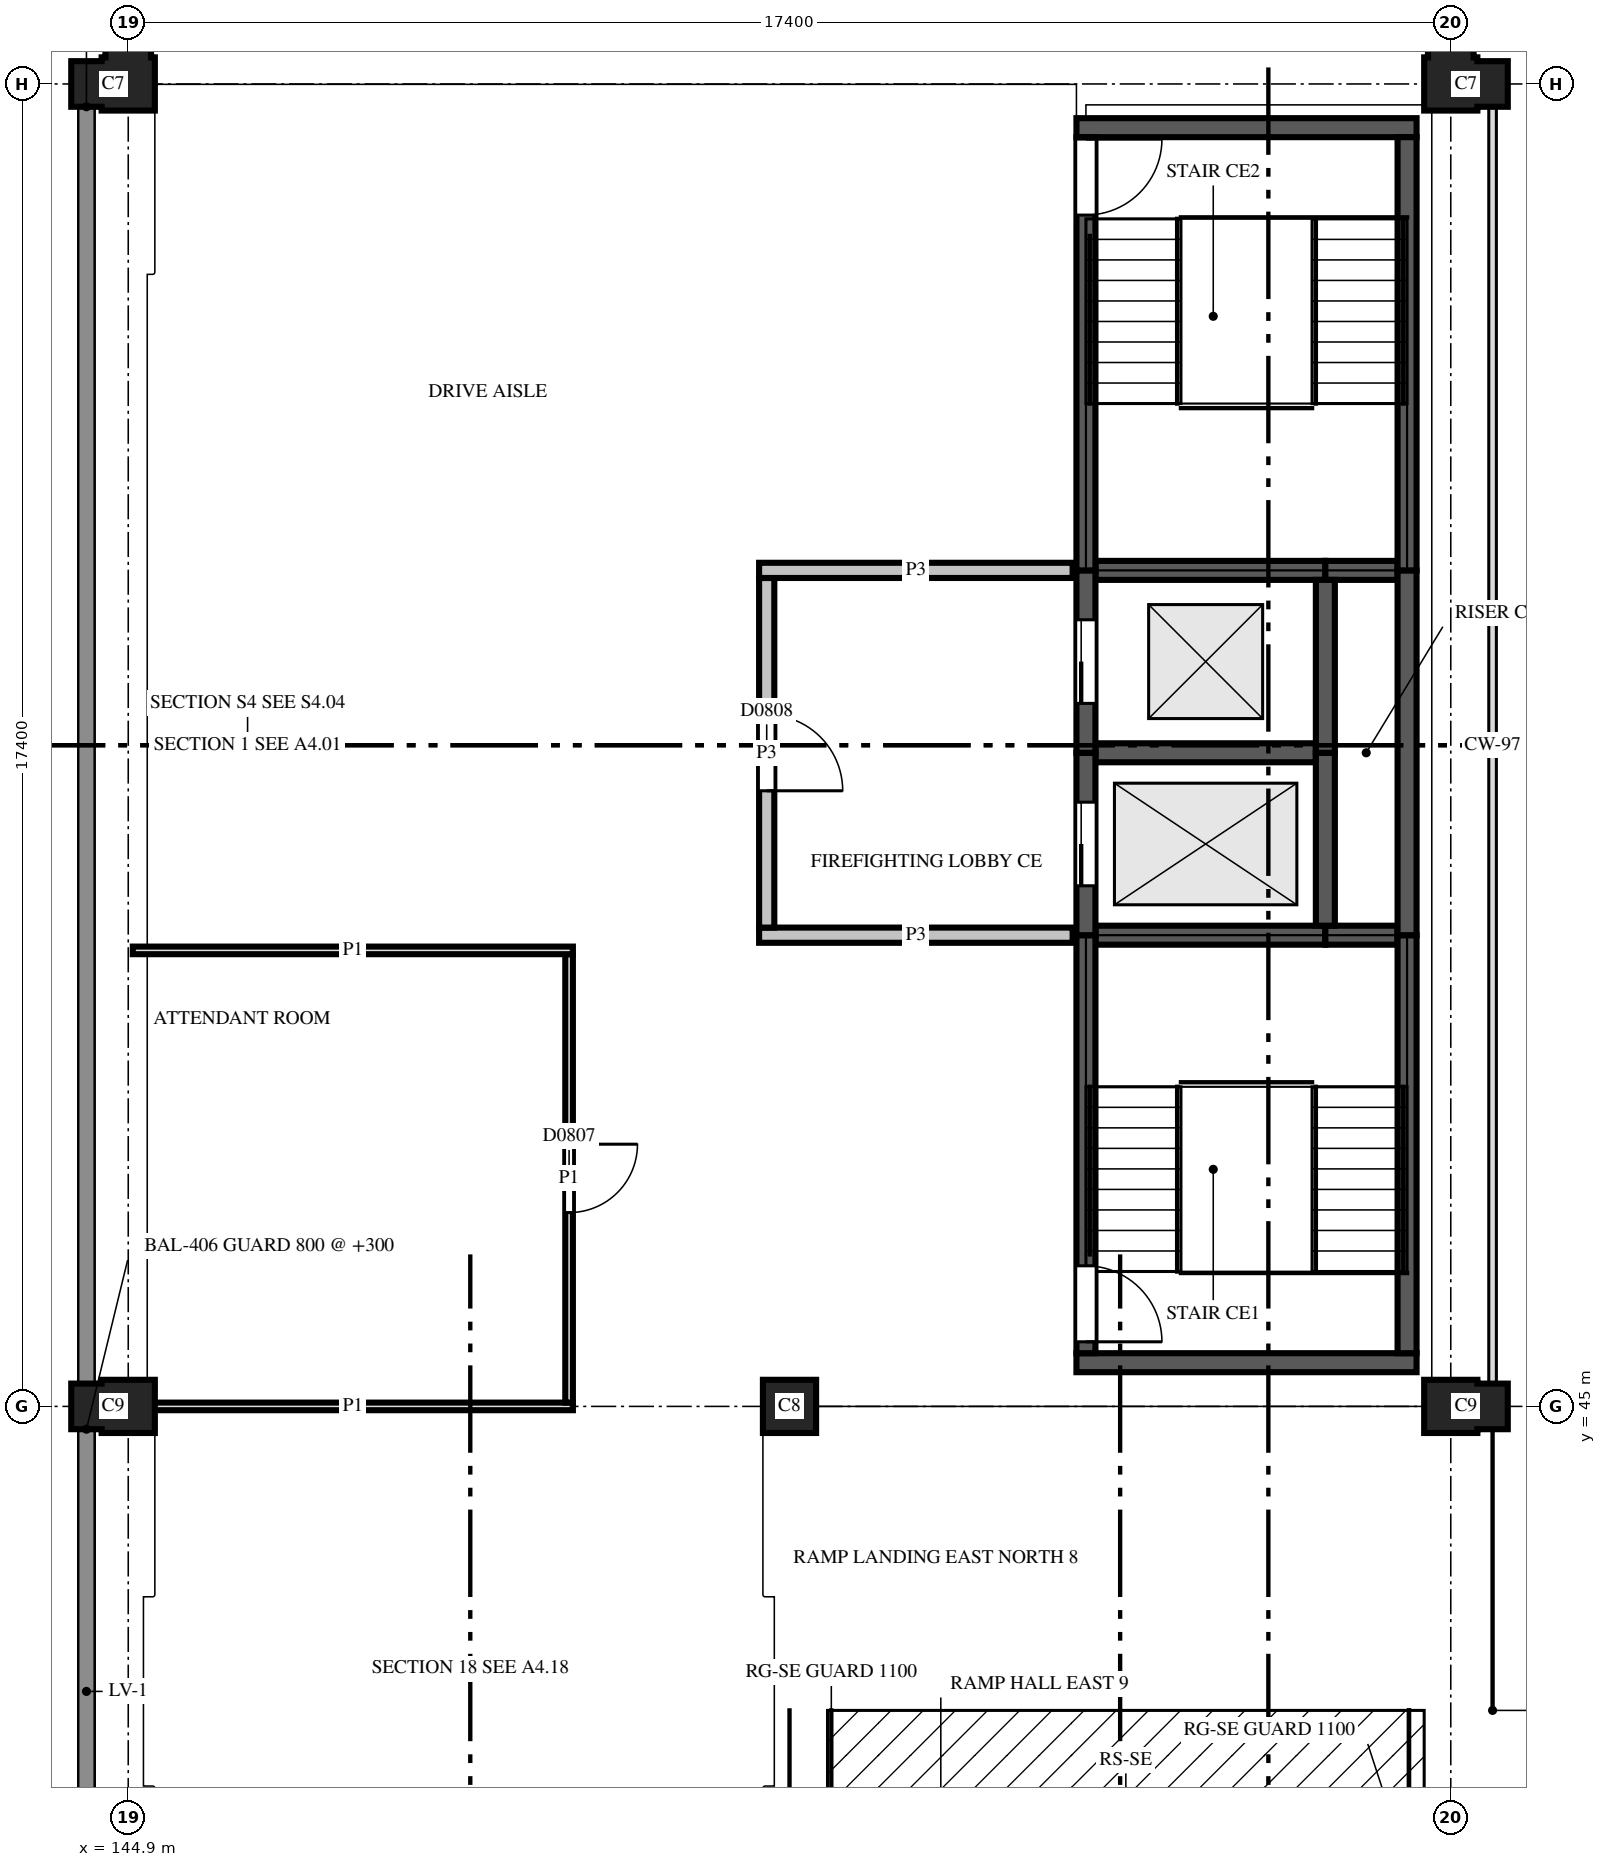
"""IFC4 building model, lengths in metres.
Left out: names, types, materials, properties, quantities, classifications, styles, units other than length and angle.
Written with IfcOpenShell. Run it as: python <this file> out.ifc"""

import sys

from ifc_helpers import new_model, si_unit, direction, frame, frame_2d, origin, place, context, subcontext, project, spatial, polyline, rectangle, outline, extrude, element, fill, save


model = new_model("IFC4")
c1 = context("Model", 3, precision=1e-05, world=origin(), true_north=direction((0.0, 1.0)))
c2 = subcontext(c1, "Body", "Model", "MODEL_VIEW")
j1 = project(units=[si_unit("LENGTHUNIT", "METRE"), si_unit("PLANEANGLEUNIT", "RADIAN")], contexts=[c1])
p1 = place(None, origin())
s1 = spatial("IfcSite", under=j1, at=p1, CompositionType="ELEMENT")
p2 = place(p1, origin())
s2 = spatial("IfcBuilding", under=s1, at=p2, CompositionType="ELEMENT")
p3 = place(p2, frame((0.0, 0.0, 30.4)))
s3 = spatial("IfcBuildingStorey", under=s2, at=p3, CompositionType="ELEMENT", Elevation=30.4)
p4 = place(p3, frame((144.9, 45.0, 0.0), z_axis=(0.0, 0.0, 1.0), x_axis=(-1.0, 0.0, 0.0)))
e1 = element("IfcColumn", 1, at=p4, inside=s3, PredefinedType="COLUMN", context=c2, shape_type="SweptSolid", body=[
    extrude(outline(polyline([(-0.35, -0.35), (0.35, -0.35), (0.35, -0.3), (0.75, -0.3), (0.75, 0.3), (0.35, 0.3), (0.35, 0.35), (-0.35, 0.35), (-0.35, -0.35)])), origin(), (0.0, 0.0, 1.0), 3.7),
])
p5 = place(p3, frame((153.6, 45.0, 0.0), z_axis=(0.0, 0.0, 1.0), x_axis=(1.0, 0.0, 0.0)))
e2 = element("IfcColumn", 2, at=p5, inside=s3, PredefinedType="COLUMN", context=c2, shape_type="SweptSolid", body=[
    extrude(outline(polyline([(-0.35, -0.35), (0.35, -0.35), (0.35, 0.35), (-0.35, 0.35), (-0.35, -0.35)])), origin(), (0.0, 0.0, 1.0), 3.7),
])
p6 = place(p3, frame((162.3, 45.0, 0.0), z_axis=(0.0, 0.0, 1.0), x_axis=(1.0, 0.0, 0.0)))
e3 = element("IfcColumn", 3, at=p6, inside=s3, PredefinedType="COLUMN", context=c2, shape_type="SweptSolid", body=[
    extrude(outline(polyline([(-0.35, -0.35), (0.35, -0.35), (0.35, -0.3), (0.75, -0.3), (0.75, 0.3), (0.35, 0.3), (0.35, 0.35), (-0.35, 0.35), (-0.35, -0.35)])), origin(), (0.0, 0.0, 1.0), 3.7),
])
for number, where, z_axis, x_axis in (
    (4, (144.9, 62.4, 0.0), (0.0, 0.0, 1.0), (0.0, 1.0, 0.0)),
    (5, (162.3, 62.4, 0.0), (0.0, 0.0, 1.0), (1.0, 0.0, 0.0)),
):
    element("IfcColumn", number, at=place(p3, frame(where, z_axis=z_axis, x_axis=x_axis)), inside=s3, PredefinedType="COLUMN", context=c2, shape_type="SweptSolid", body=[
        extrude(outline(polyline([(-0.35, -0.35), (0.35, -0.35), (0.35, -0.3), (0.75, -0.3), (0.75, 0.3), (0.35, 0.3), (0.35, 0.35), (0.3, 0.35), (0.3, 0.75), (-0.3, 0.75), (-0.3, 0.35), (-0.35, 0.35), (-0.35, -0.35)])), origin(), (0.0, 0.0, 1.0), 3.7),
    ])
p7 = place(p3, frame((157.375, 45.575, 0.0), z_axis=(0.0, 0.0, 1.0), x_axis=(1.0, 0.0, 0.0)))
e6 = element("IfcWall", 6, at=p7, inside=s3, PredefinedType="SHEAR", context=c2, shape_type="SweptSolid", body=[
    extrude(rectangle(XDim=4.475, YDim=0.25, at=frame_2d((2.238, 0.0))), origin(), (0.0, 0.0, 1.0), 3.7),
])
p8 = place(p3, frame((157.625, 51.2, 0.0), z_axis=(0.0, 0.0, 1.0), x_axis=(1.0, 0.0, 0.0)))
e7 = element("IfcWall", 7, at=p8, inside=s3, PredefinedType="SHEAR", context=c2, shape_type="SweptSolid", body=[
    extrude(rectangle(XDim=3.025, YDim=0.25, at=frame_2d((1.512, 0.0))), origin(), (0.0, 0.0, 1.0), 3.7),
])
p9 = place(p3, frame((160.65, 51.2, 0.0), z_axis=(0.0, 0.0, 1.0), x_axis=(1.0, 0.0, 0.0)))
e8 = element("IfcWall", 8, at=p9, inside=s3, PredefinedType="SHEAR", context=c2, shape_type="SweptSolid", body=[
    extrude(rectangle(XDim=0.95, YDim=0.25, at=frame_2d((0.475, 0.0))), origin(), (0.0, 0.0, 1.0), 3.7),
])
p10 = place(p3, frame((157.625, 53.6, 0.0), z_axis=(0.0, 0.0, 1.0), x_axis=(1.0, 0.0, 0.0)))
e9 = element("IfcWall", 9, at=p10, inside=s3, PredefinedType="SHEAR", context=c2, shape_type="SweptSolid", body=[
    extrude(rectangle(XDim=2.9, YDim=0.25, at=frame_2d((1.45, 0.0))), origin(), (0.0, 0.0, 1.0), 3.7),
])
p11 = place(p3, frame((157.625, 56.0, 0.0), z_axis=(0.0, 0.0, 1.0), x_axis=(1.0, 0.0, 0.0)))
e10 = element("IfcWall", 10, at=p11, inside=s3, PredefinedType="SHEAR", context=c2, shape_type="SweptSolid", body=[
    extrude(rectangle(XDim=3.025, YDim=0.25, at=frame_2d((1.512, 0.0))), origin(), (0.0, 0.0, 1.0), 3.7),
])
p12 = place(p3, frame((160.65, 56.0, 0.0), z_axis=(0.0, 0.0, 1.0), x_axis=(1.0, 0.0, 0.0)))
e11 = element("IfcWall", 11, at=p12, inside=s3, PredefinedType="SHEAR", context=c2, shape_type="SweptSolid", body=[
    extrude(rectangle(XDim=0.95, YDim=0.25, at=frame_2d((0.475, 0.0))), origin(), (0.0, 0.0, 1.0), 3.7),
])
p13 = place(p3, frame((157.375, 61.825, 0.0), z_axis=(0.0, 0.0, 1.0), x_axis=(1.0, 0.0, 0.0)))
e12 = element("IfcWall", 12, at=p13, inside=s3, PredefinedType="SHEAR", context=c2, shape_type="SweptSolid", body=[
    extrude(rectangle(XDim=4.475, YDim=0.25, at=frame_2d((2.238, 0.0))), origin(), (0.0, 0.0, 1.0), 3.7),
])
p14 = place(p3, frame((157.5, 45.7, 0.0), z_axis=(0.0, 0.0, 1.0), x_axis=(0.0, 1.0, 0.0)))
e13 = element("IfcWall", 13, at=p14, inside=s3, PredefinedType="SHEAR", context=c2, shape_type="SweptSolid", body=[
    extrude(rectangle(XDim=5.5, YDim=0.25, at=frame_2d((2.75, 0.0))), origin(), (0.0, 0.0, 1.0), 3.7),
])
p15 = place(p14, frame((0.15, 0.0, 0.0)))
e14 = element("IfcOpeningElement", 14, at=p15, cuts=e13, PredefinedType="OPENING", context=c2, shape_type="SweptSolid", body=[
    extrude(rectangle(XDim=1.0, YDim=2.1, at=frame_2d((0.5, 1.05))), frame((0.0, 0.135, 0.0), z_axis=(0.0, -1.0, 0.0), x_axis=(1.0, 0.0, 0.0)), (0.0, 0.0, 1.0), 0.27),
])
p16 = place(p3, frame((157.5, 51.2, 0.0), z_axis=(0.0, 0.0, 1.0), x_axis=(0.0, 1.0, 0.0)))
e15 = element("IfcWall", 15, at=p16, inside=s3, PredefinedType="SHEAR", context=c2, shape_type="SweptSolid", body=[
    extrude(rectangle(XDim=2.4, YDim=0.25, at=frame_2d((1.2, 0.0))), origin(), (0.0, 0.0, 1.0), 3.7),
])
p17 = place(p16, frame((0.65, 0.0, 0.0)))
e16 = element("IfcOpeningElement", 16, at=p17, cuts=e15, PredefinedType="OPENING", context=c2, shape_type="SweptSolid", body=[
    extrude(rectangle(XDim=1.1, YDim=2.1, at=frame_2d((0.55, 1.05))), frame((0.0, 0.135, 0.0), z_axis=(0.0, -1.0, 0.0), x_axis=(1.0, 0.0, 0.0)), (0.0, 0.0, 1.0), 0.27),
])
p18 = place(p3, frame((157.5, 53.6, 0.0), z_axis=(0.0, 0.0, 1.0), x_axis=(0.0, 1.0, 0.0)))
e17 = element("IfcWall", 17, at=p18, inside=s3, PredefinedType="SHEAR", context=c2, shape_type="SweptSolid", body=[
    extrude(rectangle(XDim=2.4, YDim=0.25, at=frame_2d((1.2, 0.0))), origin(), (0.0, 0.0, 1.0), 3.7),
])
p19 = place(p18, frame((0.65, 0.0, 0.0)))
e18 = element("IfcOpeningElement", 18, at=p19, cuts=e17, PredefinedType="OPENING", context=c2, shape_type="SweptSolid", body=[
    extrude(rectangle(XDim=1.1, YDim=2.1, at=frame_2d((0.55, 1.05))), frame((0.0, 0.135, 0.0), z_axis=(0.0, -1.0, 0.0), x_axis=(1.0, 0.0, 0.0)), (0.0, 0.0, 1.0), 0.27),
])
p20 = place(p3, frame((157.5, 56.0, 0.0), z_axis=(0.0, 0.0, 1.0), x_axis=(0.0, 1.0, 0.0)))
e19 = element("IfcWall", 19, at=p20, inside=s3, PredefinedType="SHEAR", context=c2, shape_type="SweptSolid", body=[
    extrude(rectangle(XDim=5.7, YDim=0.25, at=frame_2d((2.85, 0.0))), origin(), (0.0, 0.0, 1.0), 3.7),
])
p21 = place(p20, frame((4.675, 0.0, 0.0)))
e20 = element("IfcOpeningElement", 20, at=p21, cuts=e19, PredefinedType="OPENING", context=c2, shape_type="SweptSolid", body=[
    extrude(rectangle(XDim=1.0, YDim=2.1, at=frame_2d((0.5, 1.05))), frame((0.0, 0.135, 0.0), z_axis=(0.0, -1.0, 0.0), x_axis=(1.0, 0.0, 0.0)), (0.0, 0.0, 1.0), 0.27),
])
p22 = place(p3, frame((160.65, 51.325, 0.0), z_axis=(0.0, 0.0, 1.0), x_axis=(0.0, 1.0, 0.0)))
e21 = element("IfcWall", 21, at=p22, inside=s3, PredefinedType="SHEAR", context=c2, shape_type="SweptSolid", body=[
    extrude(rectangle(XDim=2.275, YDim=0.25, at=frame_2d((1.138, 0.0))), origin(), (0.0, 0.0, 1.0), 3.7),
])
p23 = place(p3, frame((160.65, 53.6, 0.0), z_axis=(0.0, 0.0, 1.0), x_axis=(0.0, 1.0, 0.0)))
e22 = element("IfcWall", 22, at=p23, inside=s3, PredefinedType="SHEAR", context=c2, shape_type="SweptSolid", body=[
    extrude(rectangle(XDim=2.275, YDim=0.25, at=frame_2d((1.137, 0.0))), origin(), (0.0, 0.0, 1.0), 3.7),
])
p24 = place(p3, frame((161.725, 45.7, 0.0), z_axis=(0.0, 0.0, 1.0), x_axis=(0.0, 1.0, 0.0)))
e23 = element("IfcWall", 23, at=p24, inside=s3, PredefinedType="SHEAR", context=c2, shape_type="SweptSolid", body=[
    extrude(rectangle(XDim=5.5, YDim=0.25, at=frame_2d((2.75, 0.0))), origin(), (0.0, 0.0, 1.0), 3.7),
])
p25 = place(p3, frame((161.725, 51.2, 0.0), z_axis=(0.0, 0.0, 1.0), x_axis=(0.0, 1.0, 0.0)))
e24 = element("IfcWall", 24, at=p25, inside=s3, PredefinedType="SHEAR", context=c2, shape_type="SweptSolid", body=[
    extrude(rectangle(XDim=4.8, YDim=0.25, at=frame_2d((2.4, 0.0))), origin(), (0.0, 0.0, 1.0), 3.7),
])
p26 = place(p3, frame((161.725, 56.0, 0.0), z_axis=(0.0, 0.0, 1.0), x_axis=(0.0, 1.0, 0.0)))
e25 = element("IfcWall", 25, at=p26, inside=s3, PredefinedType="SHEAR", context=c2, shape_type="SweptSolid", body=[
    extrude(rectangle(XDim=5.7, YDim=0.25, at=frame_2d((2.85, 0.0))), origin(), (0.0, 0.0, 1.0), 3.7),
])
p27 = place(p3, frame((144.96, 45.0, 0.0), z_axis=(0.0, 0.0, 1.0), x_axis=(1.0, 0.0, 0.0)))
e26 = element("IfcWall", 26, at=p27, inside=s3, PredefinedType="PARTITIONING", context=c2, shape_type="SweptSolid", body=[
    extrude(rectangle(XDim=5.79, YDim=0.1, at=frame_2d((2.895, 0.0))), origin(), (0.0, 0.0, 1.0), 2.88),
])
p28 = place(p3, frame((150.7, 45.05, 0.0), z_axis=(0.0, 0.0, 1.0), x_axis=(0.0, 1.0, 0.0)))
e27 = element("IfcWall", 27, at=p28, inside=s3, PredefinedType="PARTITIONING", context=c2, shape_type="SweptSolid", body=[
    extrude(rectangle(XDim=5.9, YDim=0.1, at=frame_2d((2.95, 0.0))), origin(), (0.0, 0.0, 1.0), 2.88),
])
p29 = place(p28, frame((2.5, 0.0, 0.0)))
e28 = element("IfcOpeningElement", 28, at=p29, cuts=e27, PredefinedType="OPENING", context=c2, shape_type="SweptSolid", body=[
    extrude(rectangle(XDim=0.9, YDim=2.1, at=frame_2d((0.45, 1.05))), frame((0.0, 0.06, 0.0), z_axis=(0.0, -1.0, 0.0), x_axis=(1.0, 0.0, 0.0)), (0.0, 0.0, 1.0), 0.12),
])
p30 = place(p3, frame((150.75, 51.0, 0.0), z_axis=(0.0, 0.0, 1.0), x_axis=(-1.0, 0.0, 0.0)))
e29 = element("IfcWall", 29, at=p30, inside=s3, PredefinedType="PARTITIONING", context=c2, shape_type="SweptSolid", body=[
    extrude(rectangle(XDim=5.79, YDim=0.1, at=frame_2d((2.895, 0.0))), origin(), (0.0, 0.0, 1.0), 2.88),
])
p31 = place(p3, frame((153.2, 51.2, 0.0), z_axis=(0.0, 0.0, 1.0), x_axis=(1.0, 0.0, 0.0)))
e30 = element("IfcWall", 30, at=p31, inside=s3, PredefinedType="PARTITIONING", context=c2, shape_type="SweptSolid", body=[
    extrude(rectangle(XDim=4.125, YDim=0.2, at=frame_2d((2.062, 0.0))), origin(), (0.0, 0.0, 1.0), 2.88),
])
p32 = place(p3, frame((153.3, 55.9, 0.0), z_axis=(0.0, 0.0, 1.0), x_axis=(0.0, -1.0, 0.0)))
e31 = element("IfcWall", 31, at=p32, inside=s3, PredefinedType="PARTITIONING", context=c2, shape_type="SweptSolid", body=[
    extrude(rectangle(XDim=4.6, YDim=0.2, at=frame_2d((2.3, 0.0))), origin(), (0.0, 0.0, 1.0), 2.88),
])
p33 = place(p32, frame((1.8, 0.0, 0.0)))
e32 = element("IfcOpeningElement", 32, at=p33, cuts=e31, PredefinedType="OPENING", context=c2, shape_type="SweptSolid", body=[
    extrude(rectangle(XDim=1.0, YDim=2.1, at=frame_2d((0.5, 1.05))), frame((0.0, 0.11, 0.0), z_axis=(0.0, -1.0, 0.0), x_axis=(1.0, 0.0, 0.0)), (0.0, 0.0, 1.0), 0.22),
])
p34 = place(p3, frame((157.325, 56.0, 0.0), z_axis=(0.0, 0.0, 1.0), x_axis=(-1.0, 0.0, 0.0)))
e33 = element("IfcWall", 33, at=p34, inside=s3, PredefinedType="PARTITIONING", context=c2, shape_type="SweptSolid", body=[
    extrude(rectangle(XDim=4.125, YDim=0.2, at=frame_2d((2.062, 0.0))), origin(), (0.0, 0.0, 1.0), 2.88),
])
p35 = place(p29, origin())
e34 = element("IfcDoor", 34, at=p35, inside=s3, OperationType="SINGLE_SWING_RIGHT", PredefinedType="DOOR", context=c2, shape_type="SweptSolid", body=[
    extrude(rectangle(XDim=0.9, YDim=2.1, at=frame_2d((0.45, 1.05))), frame((0.0, 0.025, 0.0), z_axis=(0.0, -1.0, 0.0), x_axis=(1.0, 0.0, 0.0)), (0.0, 0.0, 1.0), 0.05),
])
fill(e28, e34)
p36 = place(p33, origin())
e35 = element("IfcDoor", 35, at=p36, inside=s3, OperationType="SINGLE_SWING_LEFT", PredefinedType="DOOR", context=c2, shape_type="SweptSolid", body=[
    extrude(rectangle(XDim=1.0, YDim=2.1, at=frame_2d((0.5, 1.05))), frame((0.0, 0.025, 0.0), z_axis=(0.0, -1.0, 0.0), x_axis=(1.0, 0.0, 0.0)), (0.0, 0.0, 1.0), 0.05),
])
fill(e32, e35)
p37 = place(p17, origin())
e36 = element("IfcDoor", 36, at=p37, inside=s3, OperationType="SLIDING_TO_LEFT", PredefinedType="DOOR", context=c2, shape_type="SweptSolid", body=[
    extrude(rectangle(XDim=1.1, YDim=2.1, at=frame_2d((0.55, 1.05))), frame((0.0, 0.025, 0.0), z_axis=(0.0, -1.0, 0.0), x_axis=(1.0, 0.0, 0.0)), (0.0, 0.0, 1.0), 0.05),
])
fill(e16, e36)
p38 = place(p19, origin())
e37 = element("IfcDoor", 37, at=p38, inside=s3, OperationType="SLIDING_TO_LEFT", PredefinedType="DOOR", context=c2, shape_type="SweptSolid", body=[
    extrude(rectangle(XDim=1.1, YDim=2.1, at=frame_2d((0.55, 1.05))), frame((0.0, 0.025, 0.0), z_axis=(0.0, -1.0, 0.0), x_axis=(1.0, 0.0, 0.0)), (0.0, 0.0, 1.0), 0.05),
])
fill(e18, e37)
p39 = place(p21, origin())
e38 = element("IfcDoor", 38, at=p39, inside=s3, OperationType="SINGLE_SWING_RIGHT", PredefinedType="DOOR", context=c2, shape_type="SweptSolid", body=[
    extrude(rectangle(XDim=1.0, YDim=2.1, at=frame_2d((0.5, 1.05))), frame((0.0, 0.025, 0.0), z_axis=(0.0, -1.0, 0.0), x_axis=(1.0, 0.0, 0.0)), (0.0, 0.0, 1.0), 0.05),
])
fill(e20, e38)
p40 = place(p15, origin())
e39 = element("IfcDoor", 39, at=p40, inside=s3, OperationType="SINGLE_SWING_LEFT", PredefinedType="DOOR", context=c2, shape_type="SweptSolid", body=[
    extrude(rectangle(XDim=1.0, YDim=2.1, at=frame_2d((0.5, 1.05))), frame((0.0, 0.025, 0.0), z_axis=(0.0, -1.0, 0.0), x_axis=(1.0, 0.0, 0.0)), (0.0, 0.0, 1.0), 0.05),
])
fill(e14, e39)
save(model, sys.argv[1])
